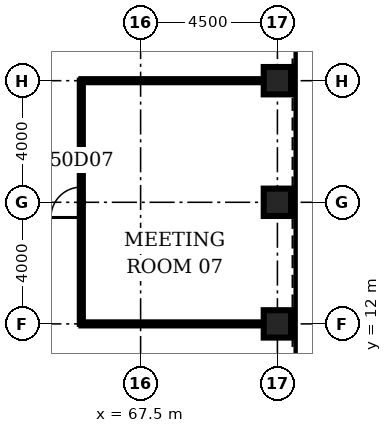
"""IFC4 building model, lengths in metres.
Left out: names, types, materials, properties, quantities, classifications, styles, units other than length and angle.
Written with IfcOpenShell. Run it as: python <this file> out.ifc"""

import sys

from ifc_helpers import new_model, si_unit, direction, frame, frame_2d, origin, origin_2d, place, context, subcontext, project, spatial, rectangle, hollow_rectangle, extrude, element, fill, save


model = new_model("IFC4")
c1 = context("Model", 3, precision=1e-05, world=origin(), true_north=direction((0.0, 1.0)))
c2 = subcontext(c1, "Body", "Model", "MODEL_VIEW")
j1 = project(units=[si_unit("LENGTHUNIT", "METRE"), si_unit("PLANEANGLEUNIT", "RADIAN")], contexts=[c1])
p1 = place(None, origin())
s1 = spatial("IfcSite", under=j1, at=p1, CompositionType="ELEMENT")
p2 = place(p1, origin())
s2 = spatial("IfcBuilding", under=s1, at=p2, CompositionType="ELEMENT")
p3 = place(p2, frame((0.0, 0.0, 223.6)))
s3 = spatial("IfcBuildingStorey", under=s2, at=p3, CompositionType="ELEMENT", Elevation=223.6)
for number, where, z_axis, x_axis in (
    (1, (72.0, 12.0, 0.0), (0.0, 0.0, 1.0), (1.0, 0.0, 0.0)),
    (2, (72.0, 16.0, 0.0), (0.0, 0.0, 1.0), (1.0, 0.0, 0.0)),
    (3, (72.0, 20.0, 0.0), (0.0, 0.0, 1.0), (1.0, 0.0, 0.0)),
):
    element("IfcColumn", number, at=place(p3, frame(where, z_axis=z_axis, x_axis=x_axis)), inside=s3, PredefinedType="COLUMN", context=c2, shape_type="SweptSolid", body=[
        extrude(hollow_rectangle(XDim=0.9, YDim=0.9, WallThickness=0.08, at=origin_2d()), origin(), (0.0, 0.0, 1.0), 4.2),
    ])
for number, where, z_axis, x_axis in (
    (4, (65.55, 12.0, 0.0), (0.0, 0.0, 1.0), (1.0, 0.0, 0.0)),
    (5, (65.55, 20.0, 0.0), (0.0, 0.0, 1.0), (1.0, 0.0, 0.0)),
):
    element("IfcWall", number, at=place(p3, frame(where, z_axis=z_axis, x_axis=x_axis)), inside=s3, PredefinedType="PARTITIONING", context=c2, shape_type="SweptSolid", body=[
        extrude(rectangle(XDim=6.0, YDim=0.1, at=frame_2d((3.0, 0.0))), origin(), (0.0, 0.0, 1.0), 3.0),
    ])
p4 = place(p3, frame((65.55, 12.0, 0.0), z_axis=(0.0, 0.0, 1.0), x_axis=(0.0, 1.0, 0.0)))
e6 = element("IfcWall", 6, at=p4, inside=s3, PredefinedType="PARTITIONING", context=c2, shape_type="SweptSolid", body=[
    extrude(rectangle(XDim=8.0, YDim=0.1, at=frame_2d((4.0, 0.0))), origin(), (0.0, 0.0, 1.0), 3.0),
])
p5 = place(p4, frame((3.5, 0.0, 0.0)))
e7 = element("IfcOpeningElement", 7, at=p5, cuts=e6, PredefinedType="OPENING", context=c2, shape_type="SweptSolid", body=[
    extrude(rectangle(XDim=1.0, YDim=2.1, at=frame_2d((0.5, 1.05))), frame((0.0, 0.06, 0.0), z_axis=(0.0, -1.0, 0.0), x_axis=(1.0, 0.0, 0.0)), (0.0, 0.0, 1.0), 0.12),
])
p6 = place(p5, origin())
e8 = element("IfcDoor", 8, at=p6, inside=s3, OperationType="SINGLE_SWING_LEFT", PredefinedType="DOOR", context=c2, shape_type="SweptSolid", body=[
    extrude(rectangle(XDim=1.0, YDim=2.1, at=frame_2d((0.5, 1.05))), frame((0.0, 0.025, 0.0), z_axis=(0.0, -1.0, 0.0), x_axis=(1.0, 0.0, 0.0)), (0.0, 0.0, 1.0), 0.05),
])
fill(e7, e8)
save(model, sys.argv[1])
